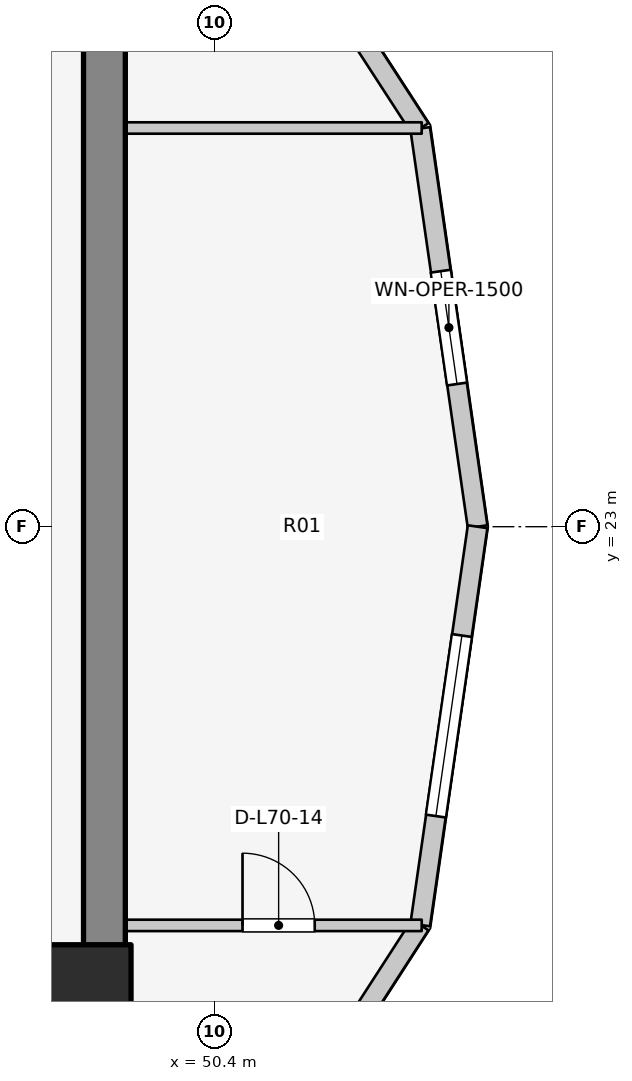
"""IFC4 building model, lengths in metres.
Left out: names, types, materials, properties, quantities, classifications, styles, units other than length and angle.
Written with IfcOpenShell. Run it as: python <this file> out.ifc"""

import sys

from ifc_helpers import new_model, si_unit, direction, frame, frame_2d, origin, origin_2d, place, context, subcontext, project, spatial, rectangle, extrude, element, fill, save


model = new_model("IFC4")
c1 = context("Model", 3, precision=1e-05, world=origin(), true_north=direction((0.0, 1.0)))
c2 = subcontext(c1, "Body", "Model", "MODEL_VIEW")
j1 = project(units=[si_unit("LENGTHUNIT", "METRE"), si_unit("PLANEANGLEUNIT", "RADIAN")], contexts=[c1])
p1 = place(None, origin())
s1 = spatial("IfcSite", under=j1, at=p1, CompositionType="ELEMENT")
p2 = place(p1, origin())
s2 = spatial("IfcBuilding", under=s1, at=p2, CompositionType="ELEMENT")
p3 = place(p2, frame((0.0, 0.0, 229.5)))
s3 = spatial("IfcBuildingStorey", under=s2, at=p3, CompositionType="ELEMENT", Elevation=229.5)
p4 = place(p3, frame((48.95, 17.05, 0.0), z_axis=(0.0, 0.0, 1.0), x_axis=(0.0, 1.0, 0.0)))
e1 = element("IfcWall", 1, at=p4, inside=s3, PredefinedType="SHEAR", context=c2, shape_type="SweptSolid", body=[
    extrude(rectangle(XDim=12.8, YDim=0.55, at=frame_2d((6.4, 0.0))), origin(), (0.0, 0.0, 1.0), 3.1),
])
p5 = place(p3, frame((48.7, 16.9, 0.0), z_axis=(0.0, 0.0, 1.0), x_axis=(1.0, 0.0, 0.0)))
e2 = element("IfcColumn", 2, at=p5, inside=s3, PredefinedType="COLUMN", context=c2, shape_type="SweptSolid", body=[
    extrude(rectangle(XDim=1.2, YDim=1.2, at=origin_2d()), origin(), (0.0, 0.0, 1.0), 3.1),
])
p6 = place(p3, frame((53.86, 23.0, 0.0), z_axis=(0.0, 0.0, 1.0), x_axis=(-0.142712754019, 0.989764148593, 0.0)))
e3 = element("IfcWall", 3, at=p6, inside=s3, PredefinedType="STANDARD", context=c2, shape_type="SweptSolid", body=[
    extrude(rectangle(XDim=5.293, YDim=0.26, at=frame_2d((2.646, 0.0))), origin(), (0.0, 0.0, 1.0), 2.85),
])
p7 = place(p6, frame((1.896, 0.0, 0.75)))
e4 = element("IfcOpeningElement", 4, at=p7, cuts=e3, PredefinedType="OPENING", context=c2, shape_type="SweptSolid", body=[
    extrude(rectangle(XDim=1.5, YDim=1.6, at=frame_2d((0.75, 0.8))), frame((0.0, 0.14, 0.0), z_axis=(0.0, -1.0, 0.0), x_axis=(1.0, 0.0, 0.0)), (0.0, 0.0, 1.0), 0.28),
])
p8 = place(p3, frame((53.105, 28.239, 0.0), z_axis=(0.0, 0.0, 1.0), x_axis=(-0.544475908819, 0.838776480784, 0.0)))
e5 = element("IfcWall", 5, at=p8, inside=s3, PredefinedType="STANDARD", context=c2, shape_type="SweptSolid", body=[
    extrude(rectangle(XDim=4.305, YDim=0.26, at=frame_2d((2.152, 0.0))), origin(), (0.0, 0.0, 1.0), 2.85),
])
p9 = place(p8, frame((1.402, 0.0, 0.75)))
e6 = element("IfcOpeningElement", 6, at=p9, cuts=e5, PredefinedType="OPENING", context=c2, shape_type="SweptSolid", body=[
    extrude(rectangle(XDim=1.5, YDim=1.6, at=frame_2d((0.75, 0.8))), frame((0.0, 0.14, 0.0), z_axis=(0.0, -1.0, 0.0), x_axis=(1.0, 0.0, 0.0)), (0.0, 0.0, 1.0), 0.28),
])
p10 = place(p3, frame((50.761, 14.133, 0.0), z_axis=(0.0, 0.0, 1.0), x_axis=(0.542641766008, 0.839964233634, 0.0)))
e7 = element("IfcWall", 7, at=p10, inside=s3, PredefinedType="STANDARD", context=c2, shape_type="SweptSolid", body=[
    extrude(rectangle(XDim=4.319, YDim=0.26, at=frame_2d((2.16, 0.0))), origin(), (0.0, 0.0, 1.0), 2.85),
])
p11 = place(p10, frame((1.41, 0.0, 0.75)))
e8 = element("IfcOpeningElement", 8, at=p11, cuts=e7, PredefinedType="OPENING", context=c2, shape_type="SweptSolid", body=[
    extrude(rectangle(XDim=1.5, YDim=1.6, at=frame_2d((0.75, 0.8))), frame((0.0, 0.14, 0.0), z_axis=(0.0, -1.0, 0.0), x_axis=(1.0, 0.0, 0.0)), (0.0, 0.0, 1.0), 0.28),
])
p12 = place(p3, frame((53.105, 17.761, 0.0), z_axis=(0.0, 0.0, 1.0), x_axis=(0.142712754019, 0.989764148593, 0.0)))
e9 = element("IfcWall", 9, at=p12, inside=s3, PredefinedType="STANDARD", context=c2, shape_type="SweptSolid", body=[
    extrude(rectangle(XDim=5.293, YDim=0.26, at=frame_2d((2.646, 0.0))), origin(), (0.0, 0.0, 1.0), 2.85),
])
p13 = place(p12, frame((1.447, 0.0, 0.75)))
e10 = element("IfcOpeningElement", 10, at=p13, cuts=e9, PredefinedType="OPENING", context=c2, shape_type="SweptSolid", body=[
    extrude(rectangle(XDim=2.4, YDim=1.7, at=frame_2d((1.2, 0.85))), frame((0.0, 0.14, 0.0), z_axis=(0.0, -1.0, 0.0), x_axis=(1.0, 0.0, 0.0)), (0.0, 0.0, 1.0), 0.28),
])
p14 = place(p3, frame((48.95, 17.755, 0.0), z_axis=(0.0, 0.0, 1.0), x_axis=(1.0, 0.0, 0.0)))
e11 = element("IfcWall", 11, at=p14, inside=s3, PredefinedType="PARTITIONING", context=c2, shape_type="SweptSolid", body=[
    extrude(rectangle(XDim=4.175, YDim=0.15, at=frame_2d((2.087, 0.0))), origin(), (0.0, 0.0, 1.0), 2.855),
])
p15 = place(p14, frame((1.817, 0.0, 0.0)))
e12 = element("IfcOpeningElement", 12, at=p15, cuts=e11, PredefinedType="OPENING", context=c2, shape_type="SweptSolid", body=[
    extrude(rectangle(XDim=0.95, YDim=2.1, at=frame_2d((0.475, 1.05))), frame((0.0, 0.085, 0.0), z_axis=(0.0, -1.0, 0.0), x_axis=(1.0, 0.0, 0.0)), (0.0, 0.0, 1.0), 0.17),
])
p16 = place(p3, frame((48.95, 28.245, 0.0), z_axis=(0.0, 0.0, 1.0), x_axis=(1.0, 0.0, 0.0)))
e13 = element("IfcWall", 13, at=p16, inside=s3, PredefinedType="PARTITIONING", context=c2, shape_type="SweptSolid", body=[
    extrude(rectangle(XDim=4.175, YDim=0.15, at=frame_2d((2.087, 0.0))), origin(), (0.0, 0.0, 1.0), 2.855),
])
p17 = place(p7, origin())
e14 = element("IfcWindow", 14, at=p17, inside=s3, PartitioningType="SINGLE_PANEL", PredefinedType="WINDOW", context=c2, shape_type="SweptSolid", body=[
    extrude(rectangle(XDim=1.5, YDim=1.6, at=frame_2d((0.75, 0.8))), frame((0.0, 0.03, 0.0), z_axis=(0.0, -1.0, 0.0), x_axis=(1.0, 0.0, 0.0)), (0.0, 0.0, 1.0), 0.06),
])
fill(e4, e14)
p18 = place(p13, origin())
e15 = element("IfcWindow", 15, at=p18, inside=s3, PartitioningType="SINGLE_PANEL", PredefinedType="WINDOW", context=c2, shape_type="SweptSolid", body=[
    extrude(rectangle(XDim=2.4, YDim=1.7, at=frame_2d((1.2, 0.85))), frame((0.0, 0.03, 0.0), z_axis=(0.0, -1.0, 0.0), x_axis=(1.0, 0.0, 0.0)), (0.0, 0.0, 1.0), 0.06),
])
fill(e10, e15)
p19 = place(p15, origin())
e16 = element("IfcDoor", 16, at=p19, inside=s3, OperationType="SINGLE_SWING_LEFT", PredefinedType="DOOR", context=c2, shape_type="SweptSolid", body=[
    extrude(rectangle(XDim=0.95, YDim=2.1, at=frame_2d((0.475, 1.05))), frame((0.0, 0.025, 0.0), z_axis=(0.0, -1.0, 0.0), x_axis=(1.0, 0.0, 0.0)), (0.0, 0.0, 1.0), 0.05),
])
fill(e12, e16)
save(model, sys.argv[1])
